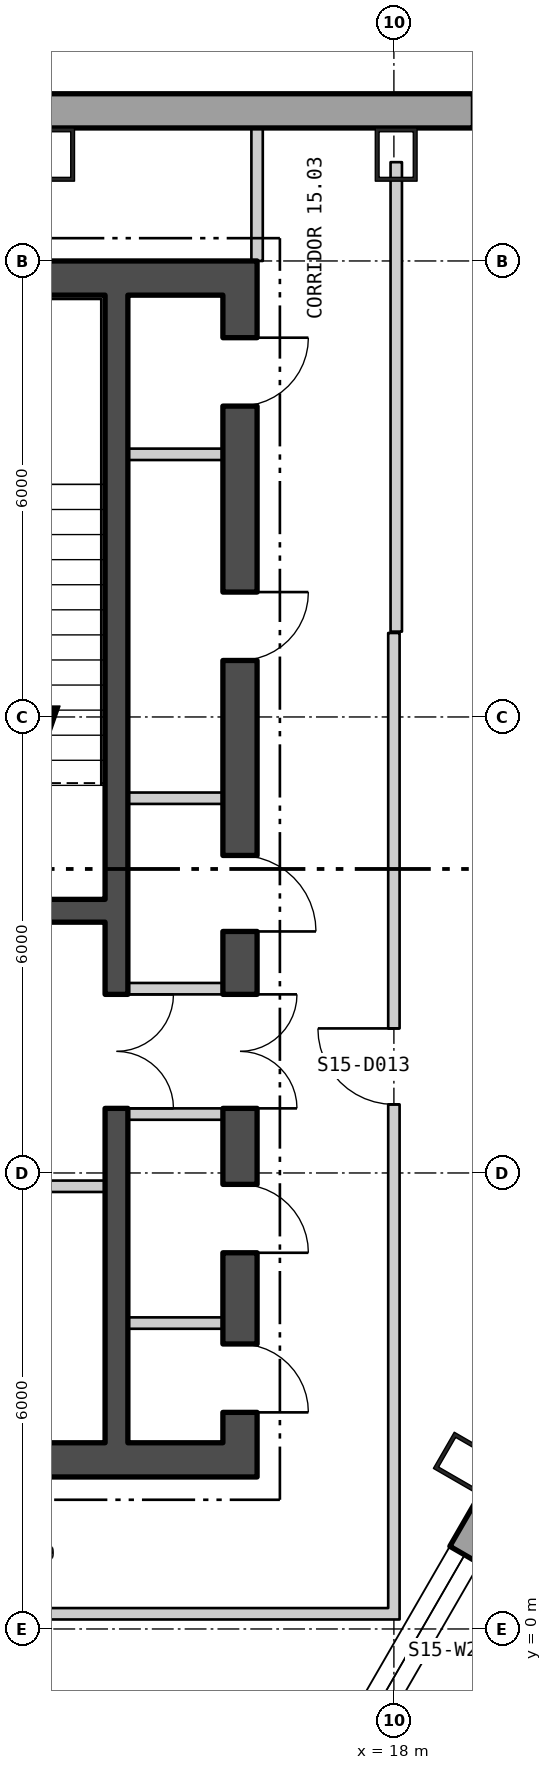
"""IFC4 building model, lengths in metres.
Left out: names, types, materials, properties, quantities, classifications, styles, units other than length and angle.
Written with IfcOpenShell. Run it as: python <this file> out.ifc"""

import sys

from ifc_helpers import new_model, si_unit, direction, frame, frame_2d, origin, origin_2d, place, context, subcontext, project, spatial, polyline, rectangle, hollow_rectangle, outline, extrude, element, fill, save


model = new_model("IFC4")
c1 = context("Model", 3, precision=1e-05, world=origin(), true_north=direction((0.0, 1.0)))
c2 = subcontext(c1, "Body", "Model", "MODEL_VIEW")
j1 = project(units=[si_unit("LENGTHUNIT", "METRE"), si_unit("PLANEANGLEUNIT", "RADIAN")], contexts=[c1])
p1 = place(None, origin())
s1 = spatial("IfcSite", under=j1, at=p1, CompositionType="ELEMENT")
p2 = place(p1, origin())
s2 = spatial("IfcBuilding", under=s1, at=p2, CompositionType="ELEMENT")
p3 = place(p2, frame((0.0, 0.0, 204.3)))
s3 = spatial("IfcBuildingStorey", under=s2, at=p3, CompositionType="ELEMENT", Elevation=204.3)
for number, where, z_axis, x_axis in (
    (1, (18.03, 19.4, 0.0), (0.0, 0.0, 1.0), (-1.0, 0.0, 0.0)),
    (2, (13.523, 19.4, 0.0), (0.0, 0.0, 1.0), (-1.0, 0.0, 0.0)),
    (3, (18.96, 2.176, 0.0), (0.0, 0.0, 1.0), (0.5, 0.866, 0.0)),
):
    element("IfcColumn", number, at=place(p3, frame(where, z_axis=z_axis, x_axis=x_axis)), inside=s3, PredefinedType="COLUMN", context=c2, shape_type="SweptSolid", body=[
        extrude(hollow_rectangle(XDim=0.55, YDim=0.7, WallThickness=0.05, at=origin_2d()), origin(), (0.0, 0.0, 1.0), 3.9),
    ])
p4 = place(p3, frame((22.87, 19.975, -0.4), z_axis=(0.0, 0.0, 1.0), x_axis=(-1.0, 0.0, 0.0)))
e4 = element("IfcWall", 4, at=p4, inside=s3, PredefinedType="SOLIDWALL", context=c2, shape_type="SweptSolid", body=[
    extrude(outline(polyline([(-0.13, -0.225), (45.87, -0.225), (45.61, 0.225), (0.13, 0.225), (-0.13, -0.225)])), origin(), (0.0, 0.0, 1.0), 3.9),
])
p5 = place(p4, frame((1.424, 0.0, 1.3)))
e5 = element("IfcOpeningElement", 5, at=p5, cuts=e4, PredefinedType="OPENING", context=c2, shape_type="SweptSolid", body=[
    extrude(rectangle(XDim=2.4, YDim=2.0, at=frame_2d((1.2, 1.0))), frame((0.0, 0.235, 0.0), z_axis=(0.0, -1.0, 0.0), x_axis=(1.0, 0.0, 0.0)), (0.0, 0.0, 1.0), 0.47),
])
p6 = place(p4, frame((10.401, 0.0, 1.3)))
e6 = element("IfcOpeningElement", 6, at=p6, cuts=e4, PredefinedType="OPENING", context=c2, shape_type="SweptSolid", body=[
    extrude(rectangle(XDim=2.4, YDim=2.0, at=frame_2d((1.2, 1.0))), frame((0.0, 0.235, 0.0), z_axis=(0.0, -1.0, 0.0), x_axis=(1.0, 0.0, 0.0)), (0.0, 0.0, 1.0), 0.47),
])
p7 = place(p4, frame((14.909, 0.0, 1.3)))
e7 = element("IfcOpeningElement", 7, at=p7, cuts=e4, PredefinedType="OPENING", context=c2, shape_type="SweptSolid", body=[
    extrude(rectangle(XDim=2.4, YDim=2.0, at=frame_2d((1.2, 1.0))), frame((0.0, 0.235, 0.0), z_axis=(0.0, -1.0, 0.0), x_axis=(1.0, 0.0, 0.0)), (0.0, 0.0, 1.0), 0.47),
])
p8 = place(p4, frame((19.416, 0.0, 1.3)))
e8 = element("IfcOpeningElement", 8, at=p8, cuts=e4, PredefinedType="OPENING", context=c2, shape_type="SweptSolid", body=[
    extrude(rectangle(XDim=2.4, YDim=2.0, at=frame_2d((1.2, 1.0))), frame((0.0, 0.235, 0.0), z_axis=(0.0, -1.0, 0.0), x_axis=(1.0, 0.0, 0.0)), (0.0, 0.0, 1.0), 0.47),
])
p9 = place(p4, frame((23.924, 0.0, 1.3)))
e9 = element("IfcOpeningElement", 9, at=p9, cuts=e4, PredefinedType="OPENING", context=c2, shape_type="SweptSolid", body=[
    extrude(rectangle(XDim=2.4, YDim=2.0, at=frame_2d((1.2, 1.0))), frame((0.0, 0.235, 0.0), z_axis=(0.0, -1.0, 0.0), x_axis=(1.0, 0.0, 0.0)), (0.0, 0.0, 1.0), 0.47),
])
p10 = place(p4, frame((28.431, 0.0, 1.3)))
e10 = element("IfcOpeningElement", 10, at=p10, cuts=e4, PredefinedType="OPENING", context=c2, shape_type="SweptSolid", body=[
    extrude(rectangle(XDim=2.4, YDim=2.0, at=frame_2d((1.2, 1.0))), frame((0.0, 0.235, 0.0), z_axis=(0.0, -1.0, 0.0), x_axis=(1.0, 0.0, 0.0)), (0.0, 0.0, 1.0), 0.47),
])
p11 = place(p4, frame((32.939, 0.0, 1.3)))
e11 = element("IfcOpeningElement", 11, at=p11, cuts=e4, PredefinedType="OPENING", context=c2, shape_type="SweptSolid", body=[
    extrude(rectangle(XDim=2.4, YDim=2.0, at=frame_2d((1.2, 1.0))), frame((0.0, 0.235, 0.0), z_axis=(0.0, -1.0, 0.0), x_axis=(1.0, 0.0, 0.0)), (0.0, 0.0, 1.0), 0.47),
])
p12 = place(p4, frame((37.447, 0.0, 1.3)))
e12 = element("IfcOpeningElement", 12, at=p12, cuts=e4, PredefinedType="OPENING", context=c2, shape_type="SweptSolid", body=[
    extrude(rectangle(XDim=2.4, YDim=2.0, at=frame_2d((1.2, 1.0))), frame((0.0, 0.235, 0.0), z_axis=(0.0, -1.0, 0.0), x_axis=(1.0, 0.0, 0.0)), (0.0, 0.0, 1.0), 0.47),
])
p13 = place(p4, frame((41.916, 0.0, 1.3)))
e13 = element("IfcOpeningElement", 13, at=p13, cuts=e4, PredefinedType="OPENING", context=c2, shape_type="SweptSolid", body=[
    extrude(rectangle(XDim=2.4, YDim=2.0, at=frame_2d((1.2, 1.0))), frame((0.0, 0.235, 0.0), z_axis=(0.0, -1.0, 0.0), x_axis=(1.0, 0.0, 0.0)), (0.0, 0.0, 1.0), 0.47),
])
p14 = place(p3, frame((3.515, -25.726, -0.18), z_axis=(0.0, 0.0, 1.0), x_axis=(0.499999764979, 0.866025539474, 0.0)))
e14 = element("IfcWall", 14, at=p14, inside=s3, PredefinedType="SOLIDWALL", context=c2, shape_type="SweptSolid", body=[
    extrude(outline(polyline([(-0.13, -0.225), (45.87, -0.225), (45.61, 0.225), (0.13, 0.225), (-0.13, -0.225)])), origin(), (0.0, 0.0, 1.0), 3.68),
])
p15 = place(p14, frame((1.424, 0.0, 1.08)))
e15 = element("IfcOpeningElement", 15, at=p15, cuts=e14, PredefinedType="OPENING", context=c2, shape_type="SweptSolid", body=[
    extrude(rectangle(XDim=2.4, YDim=2.0, at=frame_2d((1.2, 1.0))), frame((0.0, 0.235, 0.0), z_axis=(0.0, -1.0, 0.0), x_axis=(1.0, 0.0, 0.0)), (0.0, 0.0, 1.0), 0.47),
])
p16 = place(p14, frame((5.893, 0.0, 1.08)))
e16 = element("IfcOpeningElement", 16, at=p16, cuts=e14, PredefinedType="OPENING", context=c2, shape_type="SweptSolid", body=[
    extrude(rectangle(XDim=2.4, YDim=2.0, at=frame_2d((1.2, 1.0))), frame((0.0, 0.235, 0.0), z_axis=(0.0, -1.0, 0.0), x_axis=(1.0, 0.0, 0.0)), (0.0, 0.0, 1.0), 0.47),
])
p17 = place(p14, frame((10.401, 0.0, 1.08)))
e17 = element("IfcOpeningElement", 17, at=p17, cuts=e14, PredefinedType="OPENING", context=c2, shape_type="SweptSolid", body=[
    extrude(rectangle(XDim=2.4, YDim=2.0, at=frame_2d((1.2, 1.0))), frame((0.0, 0.235, 0.0), z_axis=(0.0, -1.0, 0.0), x_axis=(1.0, 0.0, 0.0)), (0.0, 0.0, 1.0), 0.47),
])
p18 = place(p14, frame((14.909, 0.0, 1.08)))
e18 = element("IfcOpeningElement", 18, at=p18, cuts=e14, PredefinedType="OPENING", context=c2, shape_type="SweptSolid", body=[
    extrude(rectangle(XDim=2.4, YDim=2.0, at=frame_2d((1.2, 1.0))), frame((0.0, 0.235, 0.0), z_axis=(0.0, -1.0, 0.0), x_axis=(1.0, 0.0, 0.0)), (0.0, 0.0, 1.0), 0.47),
])
p19 = place(p14, frame((19.416, 0.0, 1.08)))
e19 = element("IfcOpeningElement", 19, at=p19, cuts=e14, PredefinedType="OPENING", context=c2, shape_type="SweptSolid", body=[
    extrude(rectangle(XDim=2.4, YDim=2.0, at=frame_2d((1.2, 1.0))), frame((0.0, 0.235, 0.0), z_axis=(0.0, -1.0, 0.0), x_axis=(1.0, 0.0, 0.0)), (0.0, 0.0, 1.0), 0.47),
])
p20 = place(p14, frame((23.924, 0.0, 1.08)))
e20 = element("IfcOpeningElement", 20, at=p20, cuts=e14, PredefinedType="OPENING", context=c2, shape_type="SweptSolid", body=[
    extrude(rectangle(XDim=2.4, YDim=2.0, at=frame_2d((1.2, 1.0))), frame((0.0, 0.235, 0.0), z_axis=(0.0, -1.0, 0.0), x_axis=(1.0, 0.0, 0.0)), (0.0, 0.0, 1.0), 0.47),
])
p21 = place(p14, frame((28.431, 0.0, 1.08)))
e21 = element("IfcOpeningElement", 21, at=p21, cuts=e14, PredefinedType="OPENING", context=c2, shape_type="SweptSolid", body=[
    extrude(rectangle(XDim=2.4, YDim=2.0, at=frame_2d((1.2, 1.0))), frame((0.0, 0.235, 0.0), z_axis=(0.0, -1.0, 0.0), x_axis=(1.0, 0.0, 0.0)), (0.0, 0.0, 1.0), 0.47),
])
p22 = place(p14, frame((32.939, 0.0, 1.08)))
e22 = element("IfcOpeningElement", 22, at=p22, cuts=e14, PredefinedType="OPENING", context=c2, shape_type="SweptSolid", body=[
    extrude(rectangle(XDim=2.4, YDim=2.0, at=frame_2d((1.2, 1.0))), frame((0.0, 0.235, 0.0), z_axis=(0.0, -1.0, 0.0), x_axis=(1.0, 0.0, 0.0)), (0.0, 0.0, 1.0), 0.47),
])
p23 = place(p14, frame((37.447, 0.0, 1.08)))
e23 = element("IfcOpeningElement", 23, at=p23, cuts=e14, PredefinedType="OPENING", context=c2, shape_type="SweptSolid", body=[
    extrude(rectangle(XDim=2.4, YDim=2.0, at=frame_2d((1.2, 1.0))), frame((0.0, 0.235, 0.0), z_axis=(0.0, -1.0, 0.0), x_axis=(1.0, 0.0, 0.0)), (0.0, 0.0, 1.0), 0.47),
])
p24 = place(p14, frame((41.916, 0.0, 1.08)))
e24 = element("IfcOpeningElement", 24, at=p24, cuts=e14, PredefinedType="OPENING", context=c2, shape_type="SweptSolid", body=[
    extrude(rectangle(XDim=2.4, YDim=2.0, at=frame_2d((1.2, 1.0))), frame((0.0, 0.235, 0.0), z_axis=(0.0, -1.0, 0.0), x_axis=(1.0, 0.0, 0.0)), (0.0, 0.0, 1.0), 0.47),
])
p25 = place(p3, frame((-16.2, 2.225, 0.0), z_axis=(0.0, 0.0, 1.0), x_axis=(1.0, 0.0, 0.0)))
e25 = element("IfcWall", 25, at=p25, inside=s3, PredefinedType="SHEAR", context=c2, shape_type="SweptSolid", body=[
    extrude(rectangle(XDim=32.4, YDim=0.45, at=frame_2d((16.2, 0.0))), origin(), (0.0, 0.0, 1.0), 3.7),
])
p26 = place(p25, frame((10.7, 0.0, 0.0)))
e26 = element("IfcOpeningElement", 26, at=p26, cuts=e25, PredefinedType="OPENING", context=c2, shape_type="SweptSolid", body=[
    extrude(rectangle(XDim=1.8, YDim=2.4, at=frame_2d((0.9, 1.2))), frame((0.0, 0.235, 0.0), z_axis=(0.0, -1.0, 0.0), x_axis=(1.0, 0.0, 0.0)), (0.0, 0.0, 1.0), 0.47),
])
p27 = place(p25, frame((20.7, 0.0, 0.0)))
e27 = element("IfcOpeningElement", 27, at=p27, cuts=e25, PredefinedType="OPENING", context=c2, shape_type="SweptSolid", body=[
    extrude(rectangle(XDim=1.8, YDim=2.4, at=frame_2d((0.9, 1.2))), frame((0.0, 0.235, 0.0), z_axis=(0.0, -1.0, 0.0), x_axis=(1.0, 0.0, 0.0)), (0.0, 0.0, 1.0), 0.47),
])
p28 = place(p3, frame((-16.2, 17.775, 0.0), z_axis=(0.0, 0.0, 1.0), x_axis=(1.0, 0.0, 0.0)))
e28 = element("IfcWall", 28, at=p28, inside=s3, PredefinedType="SHEAR", context=c2, shape_type="SweptSolid", body=[
    extrude(rectangle(XDim=32.4, YDim=0.45, at=frame_2d((16.2, 0.0))), origin(), (0.0, 0.0, 1.0), 3.7),
])
p29 = place(p3, frame((15.975, 2.45, 0.0), z_axis=(0.0, 0.0, 1.0), x_axis=(0.0, 1.0, 0.0)))
e29 = element("IfcWall", 29, at=p29, inside=s3, PredefinedType="SHEAR", context=c2, shape_type="SweptSolid", body=[
    extrude(rectangle(XDim=15.1, YDim=0.45, at=frame_2d((7.55, 0.0))), origin(), (0.0, 0.0, 1.0), 3.7),
])
p30 = place(p29, frame((4.4, 0.0, 0.0)))
e30 = element("IfcOpeningElement", 30, at=p30, cuts=e29, PredefinedType="OPENING", context=c2, shape_type="SweptSolid", body=[
    extrude(rectangle(XDim=1.5, YDim=2.1, at=frame_2d((0.75, 1.05))), frame((0.0, 0.235, 0.0), z_axis=(0.0, -1.0, 0.0), x_axis=(1.0, 0.0, 0.0)), (0.0, 0.0, 1.0), 0.47),
])
p31 = place(p29, frame((0.4, 0.0, 0.0)))
e31 = element("IfcOpeningElement", 31, at=p31, cuts=e29, PredefinedType="OPENING", context=c2, shape_type="SweptSolid", body=[
    extrude(rectangle(XDim=0.9, YDim=2.1, at=frame_2d((0.45, 1.05))), frame((0.0, 0.235, 0.0), z_axis=(0.0, -1.0, 0.0), x_axis=(1.0, 0.0, 0.0)), (0.0, 0.0, 1.0), 0.47),
])
p32 = place(p29, frame((2.5, 0.0, 0.0)))
e32 = element("IfcOpeningElement", 32, at=p32, cuts=e29, PredefinedType="OPENING", context=c2, shape_type="SweptSolid", body=[
    extrude(rectangle(XDim=0.9, YDim=2.1, at=frame_2d((0.45, 1.05))), frame((0.0, 0.235, 0.0), z_axis=(0.0, -1.0, 0.0), x_axis=(1.0, 0.0, 0.0)), (0.0, 0.0, 1.0), 0.47),
])
p33 = place(p29, frame((6.728, 0.0, 0.0)))
e33 = element("IfcOpeningElement", 33, at=p33, cuts=e29, PredefinedType="OPENING", context=c2, shape_type="SweptSolid", body=[
    extrude(rectangle(XDim=1.0, YDim=2.1, at=frame_2d((0.5, 1.05))), frame((0.0, 0.235, 0.0), z_axis=(0.0, -1.0, 0.0), x_axis=(1.0, 0.0, 0.0)), (0.0, 0.0, 1.0), 0.47),
])
p34 = place(p29, frame((10.293, 0.0, 0.0)))
e34 = element("IfcOpeningElement", 34, at=p34, cuts=e29, PredefinedType="OPENING", context=c2, shape_type="SweptSolid", body=[
    extrude(rectangle(XDim=0.9, YDim=2.1, at=frame_2d((0.45, 1.05))), frame((0.0, 0.235, 0.0), z_axis=(0.0, -1.0, 0.0), x_axis=(1.0, 0.0, 0.0)), (0.0, 0.0, 1.0), 0.47),
])
p35 = place(p29, frame((13.64, 0.0, 0.0)))
e35 = element("IfcOpeningElement", 35, at=p35, cuts=e29, PredefinedType="OPENING", context=c2, shape_type="SweptSolid", body=[
    extrude(rectangle(XDim=0.9, YDim=2.1, at=frame_2d((0.45, 1.05))), frame((0.0, 0.235, 0.0), z_axis=(0.0, -1.0, 0.0), x_axis=(1.0, 0.0, 0.0)), (0.0, 0.0, 1.0), 0.47),
])
p36 = place(p3, frame((14.35, 2.45, 0.0), z_axis=(0.0, 0.0, 1.0), x_axis=(0.0, 1.0, 0.0)))
e36 = element("IfcWall", 36, at=p36, inside=s3, PredefinedType="SHEAR", context=c2, shape_type="SweptSolid", body=[
    extrude(rectangle(XDim=15.1, YDim=0.3, at=frame_2d((7.55, 0.0))), origin(), (0.0, 0.0, 1.0), 3.7),
])
p37 = place(p36, frame((4.4, 0.0, 0.0)))
e37 = element("IfcOpeningElement", 37, at=p37, cuts=e36, PredefinedType="OPENING", context=c2, shape_type="SweptSolid", body=[
    extrude(rectangle(XDim=1.5, YDim=2.1, at=frame_2d((0.75, 1.05))), frame((0.0, 0.16, 0.0), z_axis=(0.0, -1.0, 0.0), x_axis=(1.0, 0.0, 0.0)), (0.0, 0.0, 1.0), 0.32),
])
p38 = place(p3, frame((11.0, 9.45, 0.0), z_axis=(0.0, 0.0, 1.0), x_axis=(1.0, 0.0, 0.0)))
e38 = element("IfcWall", 38, at=p38, inside=s3, PredefinedType="SHEAR", context=c2, shape_type="SweptSolid", body=[
    extrude(rectangle(XDim=3.2, YDim=0.3, at=frame_2d((1.6, 0.0))), origin(), (0.0, 0.0, 1.0), 3.7),
])
p39 = place(p38, frame((1.0, 0.0, 0.0)))
e39 = element("IfcOpeningElement", 39, at=p39, cuts=e38, PredefinedType="OPENING", context=c2, shape_type="SweptSolid", body=[
    extrude(rectangle(XDim=1.2, YDim=2.1, at=frame_2d((0.6, 1.05))), frame((0.0, 0.16, 0.0), z_axis=(0.0, -1.0, 0.0), x_axis=(1.0, 0.0, 0.0)), (0.0, 0.0, 1.0), 0.32),
])
p40 = place(p3, frame((11.0, 5.825, 0.0), z_axis=(0.0, 0.0, 1.0), x_axis=(1.0, 0.0, 0.0)))
e40 = element("IfcWall", 40, at=p40, inside=s3, PredefinedType="PARTITIONING", context=c2, shape_type="SweptSolid", body=[
    extrude(rectangle(XDim=3.2, YDim=0.15, at=frame_2d((1.6, 0.0))), origin(), (0.0, 0.0, 1.0), 3.7),
])
for number, where, z_axis, x_axis in (
    (41, (14.5, 6.775, 0.0), (0.0, 0.0, 1.0), (1.0, 0.0, 0.0)),
    (42, (14.5, 8.425, 0.0), (0.0, 0.0, 1.0), (1.0, 0.0, 0.0)),
    (43, (14.5, 4.025, 0.0), (0.0, 0.0, 1.0), (1.0, 0.0, 0.0)),
    (44, (14.5, 10.931, 0.0), (0.0, 0.0, 1.0), (1.0, 0.0, 0.0)),
    (45, (14.5, 15.456, 0.0), (0.0, 0.0, 1.0), (1.0, 0.0, 0.0)),
):
    element("IfcWall", number, at=place(p3, frame(where, z_axis=z_axis, x_axis=x_axis)), inside=s3, PredefinedType="PARTITIONING", context=c2, shape_type="SweptSolid", body=[
        extrude(rectangle(XDim=1.25, YDim=0.15, at=frame_2d((0.625, 0.0))), origin(), (0.0, 0.0, 1.0), 3.7),
    ])
p41 = place(p3, frame((6.824, 0.2, 0.0), z_axis=(0.0, 0.0, 1.0), x_axis=(1.0, 0.0, 0.0)))
e46 = element("IfcWall", 46, at=p41, inside=s3, PredefinedType="PARTITIONING", context=c2, shape_type="SweptSolid", body=[
    extrude(rectangle(XDim=11.101, YDim=0.15, at=frame_2d((5.551, 0.0))), origin(), (0.0, 0.0, 1.0), 3.7),
])
p42 = place(p3, frame((16.2, 18.0, 0.0), z_axis=(0.0, 0.0, 1.0), x_axis=(0.0, 1.0, 0.0)))
e47 = element("IfcWall", 47, at=p42, inside=s3, PredefinedType="PARTITIONING", context=c2, shape_type="SweptSolid", body=[
    extrude(rectangle(XDim=1.75, YDim=0.15, at=frame_2d((0.875, 0.0))), origin(), (0.0, 0.0, 1.0), 3.7),
])
p43 = place(p3, frame((18.0, 0.125, 0.0), z_axis=(0.0, 0.0, 1.0), x_axis=(0.0, 1.0, 0.0)))
e48 = element("IfcWall", 48, at=p43, inside=s3, PredefinedType="PARTITIONING", context=c2, shape_type="SweptSolid", body=[
    extrude(rectangle(XDim=12.98, YDim=0.15, at=frame_2d((6.49, 0.0))), origin(), (0.0, 0.0, 1.0), 3.7),
])
p44 = place(p43, frame((6.777, 0.0, 0.0)))
e49 = element("IfcOpeningElement", 49, at=p44, cuts=e48, PredefinedType="OPENING", context=c2, shape_type="SweptSolid", body=[
    extrude(rectangle(XDim=1.0, YDim=2.1, at=frame_2d((0.5, 1.05))), frame((0.0, 0.085, 0.0), z_axis=(0.0, -1.0, 0.0), x_axis=(1.0, 0.0, 0.0)), (0.0, 0.0, 1.0), 0.17),
])
p45 = place(p3, frame((18.031, 13.123, 0.0), z_axis=(0.0, 0.0, 1.0), x_axis=(0.0, 1.0, 0.0)))
e50 = element("IfcWall", 50, at=p45, inside=s3, PredefinedType="PARTITIONING", context=c2, shape_type="SweptSolid", body=[
    extrude(rectangle(XDim=6.177, YDim=0.15, at=frame_2d((3.088, 0.0))), origin(), (0.0, 0.0, 1.0), 3.7),
])
p46 = place(p21, origin())
e51 = element("IfcWindow", 51, at=p46, inside=s3, PartitioningType="SINGLE_PANEL", PredefinedType="WINDOW", context=c2, shape_type="SweptSolid", body=[
    extrude(rectangle(XDim=2.4, YDim=2.0, at=frame_2d((1.2, 1.0))), frame((0.0, 0.105, 0.0), z_axis=(0.0, -1.0, 0.0), x_axis=(1.0, 0.0, 0.0)), (0.0, 0.0, 1.0), 0.06),
])
fill(e21, e51)
p47 = place(p37, origin())
e52 = element("IfcDoor", 52, at=p47, inside=s3, OperationType="DOUBLE_DOOR_SINGLE_SWING", PredefinedType="DOOR", context=c2, shape_type="SweptSolid", body=[
    extrude(rectangle(XDim=1.5, YDim=2.1, at=frame_2d((0.75, 1.05))), frame((0.0, 0.025, 0.0), z_axis=(0.0, -1.0, 0.0), x_axis=(1.0, 0.0, 0.0)), (0.0, 0.0, 1.0), 0.05),
])
fill(e37, e52)
p48 = place(p30, origin())
e53 = element("IfcDoor", 53, at=p48, inside=s3, OperationType="DOUBLE_DOOR_SINGLE_SWING", PredefinedType="DOOR", context=c2, shape_type="SweptSolid", body=[
    extrude(rectangle(XDim=1.5, YDim=2.1, at=frame_2d((0.75, 1.05))), frame((0.0, 0.025, 0.0), z_axis=(0.0, -1.0, 0.0), x_axis=(1.0, 0.0, 0.0)), (0.0, 0.0, 1.0), 0.05),
])
fill(e30, e53)
p49 = place(p31, origin())
e54 = element("IfcDoor", 54, at=p49, inside=s3, OperationType="SINGLE_SWING_LEFT", PredefinedType="DOOR", context=c2, shape_type="SweptSolid", body=[
    extrude(rectangle(XDim=0.9, YDim=2.1, at=frame_2d((0.45, 1.05))), frame((0.0, 0.025, 0.0), z_axis=(0.0, -1.0, 0.0), x_axis=(1.0, 0.0, 0.0)), (0.0, 0.0, 1.0), 0.05),
])
fill(e31, e54)
p50 = place(p32, origin())
e55 = element("IfcDoor", 55, at=p50, inside=s3, OperationType="SINGLE_SWING_LEFT", PredefinedType="DOOR", context=c2, shape_type="SweptSolid", body=[
    extrude(rectangle(XDim=0.9, YDim=2.1, at=frame_2d((0.45, 1.05))), frame((0.0, 0.025, 0.0), z_axis=(0.0, -1.0, 0.0), x_axis=(1.0, 0.0, 0.0)), (0.0, 0.0, 1.0), 0.05),
])
fill(e32, e55)
p51 = place(p33, origin())
e56 = element("IfcDoor", 56, at=p51, inside=s3, OperationType="SINGLE_SWING_LEFT", PredefinedType="DOOR", context=c2, shape_type="SweptSolid", body=[
    extrude(rectangle(XDim=1.0, YDim=2.1, at=frame_2d((0.5, 1.05))), frame((0.0, 0.025, 0.0), z_axis=(0.0, -1.0, 0.0), x_axis=(1.0, 0.0, 0.0)), (0.0, 0.0, 1.0), 0.05),
])
fill(e33, e56)
p52 = place(p34, origin())
e57 = element("IfcDoor", 57, at=p52, inside=s3, OperationType="SINGLE_SWING_RIGHT", PredefinedType="DOOR", context=c2, shape_type="SweptSolid", body=[
    extrude(rectangle(XDim=0.9, YDim=2.1, at=frame_2d((0.45, 1.05))), frame((0.0, 0.025, 0.0), z_axis=(0.0, -1.0, 0.0), x_axis=(1.0, 0.0, 0.0)), (0.0, 0.0, 1.0), 0.05),
])
fill(e34, e57)
p53 = place(p35, origin())
e58 = element("IfcDoor", 58, at=p53, inside=s3, OperationType="SINGLE_SWING_RIGHT", PredefinedType="DOOR", context=c2, shape_type="SweptSolid", body=[
    extrude(rectangle(XDim=0.9, YDim=2.1, at=frame_2d((0.45, 1.05))), frame((0.0, 0.025, 0.0), z_axis=(0.0, -1.0, 0.0), x_axis=(1.0, 0.0, 0.0)), (0.0, 0.0, 1.0), 0.05),
])
fill(e35, e58)
p54 = place(p44, origin())
e59 = element("IfcDoor", 59, at=p54, inside=s3, OperationType="SINGLE_SWING_LEFT", PredefinedType="DOOR", context=c2, shape_type="SweptSolid", body=[
    extrude(rectangle(XDim=1.0, YDim=2.1, at=frame_2d((0.5, 1.05))), frame((0.0, 0.025, 0.0), z_axis=(0.0, -1.0, 0.0), x_axis=(1.0, 0.0, 0.0)), (0.0, 0.0, 1.0), 0.05),
])
fill(e49, e59)
save(model, sys.argv[1])
